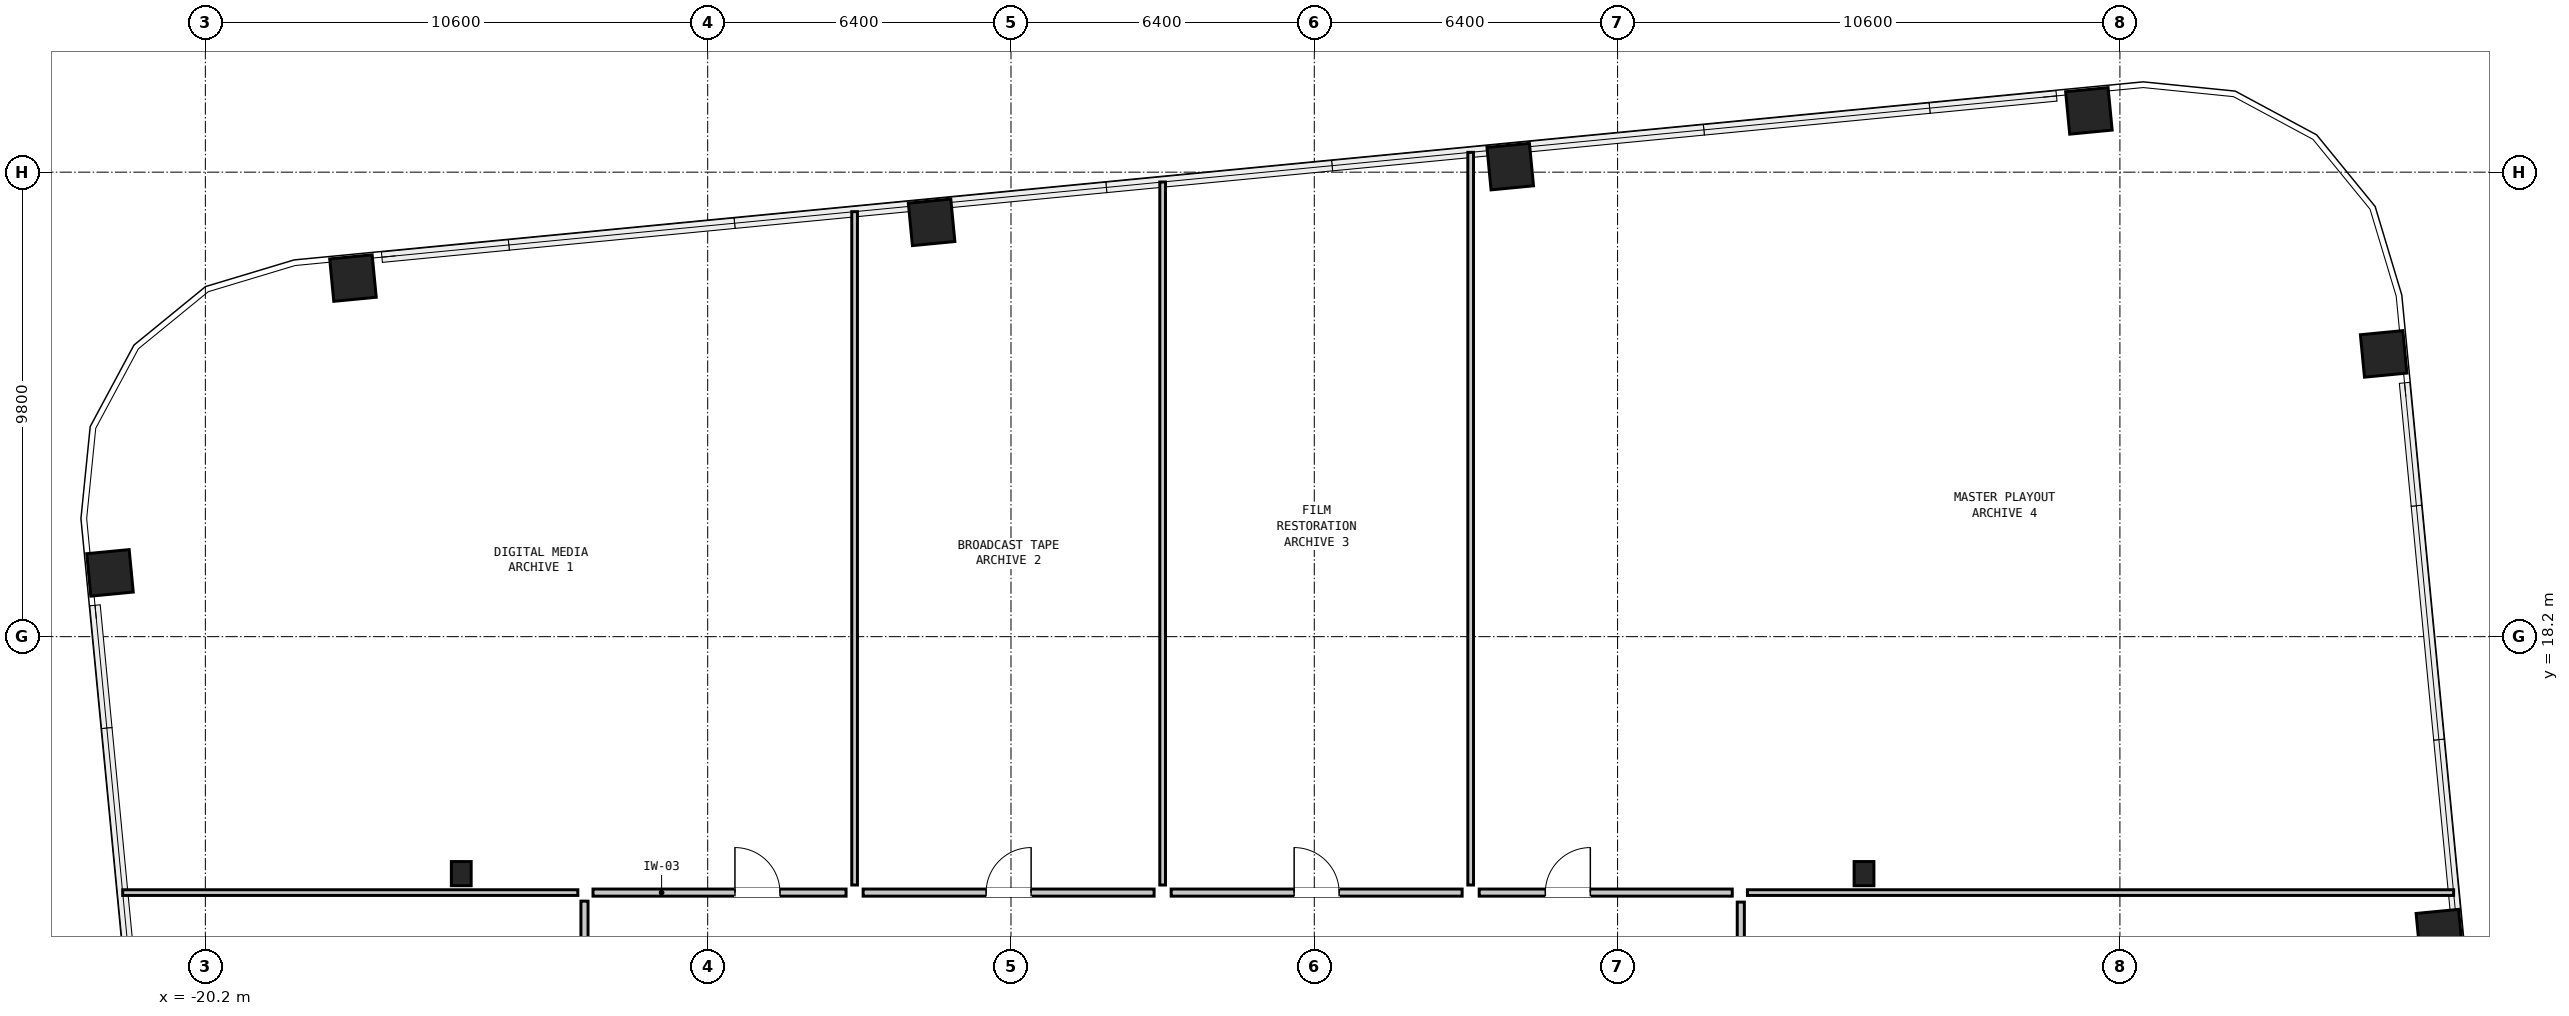
"""IFC4 building model, lengths in metres.
Left out: names, types, materials, properties, quantities, classifications, styles, units other than length and angle.
Written with IfcOpenShell. Run it as: python <this file> out.ifc"""

import sys

from ifc_helpers import new_model, si_unit, direction, frame, frame_2d, origin, origin_2d, place, context, subcontext, project, spatial, rectangle, hollow_rectangle, i_section, extrude, element, fill, save


model = new_model("IFC4")
c1 = context("Model", 3, precision=1e-05, world=origin(), true_north=direction((0.0, 1.0)))
c2 = subcontext(c1, "Body", "Model", "MODEL_VIEW")
j1 = project(units=[si_unit("LENGTHUNIT", "METRE"), si_unit("PLANEANGLEUNIT", "RADIAN")], contexts=[c1])
p1 = place(None, origin())
s1 = spatial("IfcSite", under=j1, at=p1, CompositionType="ELEMENT")
p2 = place(p1, origin())
s2 = spatial("IfcBuilding", under=s1, at=p2, CompositionType="ELEMENT")
p3 = place(p2, frame((0.0, 0.0, 87.75)))
s3 = spatial("IfcBuildingStorey", under=s2, at=p3, CompositionType="ELEMENT", Elevation=87.75)
for number, where, z_axis, x_axis in (
    (1, (26.941, 11.955, 0.0), (0.0, 0.0, 1.0), (-0.096, 0.995, 0.0)),
    (2, (25.765, 24.165, 0.0), (0.0, 0.0, 1.0), (-0.096, 0.995, 0.0)),
    (3, (19.545, 29.292, 0.0), (0.0, 0.0, 1.0), (0.995, 0.096, 0.0)),
    (4, (7.335, 28.117, 0.0), (0.0, 0.0, 1.0), (0.995, 0.096, 0.0)),
    (5, (-4.875, 26.941, 0.0), (0.0, 0.0, 1.0), (0.995, 0.096, 0.0)),
    (6, (-17.085, 25.765, 0.0), (0.0, 0.0, 1.0), (0.995, 0.096, 0.0)),
    (7, (-22.213, 19.545, 0.0), (0.0, 0.0, 1.0), (-0.096, 0.995, 0.0)),
):
    element("IfcColumn", number, at=place(p3, frame(where, z_axis=z_axis, x_axis=x_axis)), inside=s3, PredefinedType="COLUMN", context=c2, shape_type="SweptSolid", body=[
        extrude(hollow_rectangle(XDim=0.9, YDim=0.9, WallThickness=0.055, at=origin_2d()), origin(), (0.0, 0.0, 1.0), 3.05),
    ])
for number, where, z_axis, x_axis in (
    (8, (-14.8, 13.2, 0.0), (0.0, 0.0, 1.0), (1.0, 0.0, 0.0)),
    (9, (14.8, 13.2, 0.0), (0.0, 0.0, 1.0), (1.0, 0.0, 0.0)),
):
    element("IfcColumn", number, at=place(p3, frame(where, z_axis=z_axis, x_axis=x_axis)), inside=s3, PredefinedType="COLUMN", context=c2, shape_type="SweptSolid", body=[
        extrude(i_section(OverallWidth=0.418, OverallDepth=0.51, WebThickness=0.042, FlangeThickness=0.068, at=origin_2d()), origin(), (0.0, 0.0, 1.0), 3.05),
    ])
p4 = place(p3, frame((-21.945, 12.8, 0.0), z_axis=(0.0, 0.0, 1.0), x_axis=(1.0, 0.0, 0.0)))
e10 = element("IfcWall", 10, at=p4, inside=s3, PredefinedType="PARTITIONING", context=c2, shape_type="SweptSolid", body=[
    extrude(rectangle(XDim=9.605, YDim=0.12, at=frame_2d((4.802, 0.0))), origin(), (0.0, 0.0, 1.0), 2.83),
])
p5 = place(p3, frame((12.34, 12.8, 0.0), z_axis=(0.0, 0.0, 1.0), x_axis=(1.0, 0.0, 0.0)))
e11 = element("IfcWall", 11, at=p5, inside=s3, PredefinedType="PARTITIONING", context=c2, shape_type="SweptSolid", body=[
    extrude(rectangle(XDim=14.902, YDim=0.12, at=frame_2d((7.451, 0.0))), origin(), (0.0, 0.0, 1.0), 2.83),
])
p6 = place(p3, frame((-6.5, 12.96, 0.0), z_axis=(0.0, 0.0, 1.0), x_axis=(0.0, 1.0, 0.0)))
e12 = element("IfcWall", 12, at=p6, inside=s3, PredefinedType="PARTITIONING", context=c2, shape_type="SweptSolid", body=[
    extrude(rectangle(XDim=14.207, YDim=0.12, at=frame_2d((7.103, 0.0))), origin(), (0.0, 0.0, 1.0), 2.274),
])
p7 = place(p3, frame((0.0, 12.96, 0.0), z_axis=(0.0, 0.0, 1.0), x_axis=(0.0, 1.0, 0.0)))
e13 = element("IfcWall", 13, at=p7, inside=s3, PredefinedType="PARTITIONING", context=c2, shape_type="SweptSolid", body=[
    extrude(rectangle(XDim=14.833, YDim=0.12, at=frame_2d((7.416, 0.0))), origin(), (0.0, 0.0, 1.0), 2.274),
])
p8 = place(p3, frame((6.5, 12.96, 0.0), z_axis=(0.0, 0.0, 1.0), x_axis=(0.0, 1.0, 0.0)))
e14 = element("IfcWall", 14, at=p8, inside=s3, PredefinedType="PARTITIONING", context=c2, shape_type="SweptSolid", body=[
    extrude(rectangle(XDim=15.458, YDim=0.12, at=frame_2d((7.729, 0.0))), origin(), (0.0, 0.0, 1.0), 2.274),
])
p9 = place(p3, frame((-12.02, 12.8, 0.0), z_axis=(0.0, 0.0, 1.0), x_axis=(1.0, 0.0, 0.0)))
e15 = element("IfcWall", 15, at=p9, inside=s3, PredefinedType="PARTITIONING", context=c2, shape_type="SweptSolid", body=[
    extrude(rectangle(XDim=5.34, YDim=0.15, at=frame_2d((2.67, 0.0))), origin(), (0.0, 0.0, 1.0), 2.83),
])
p10 = place(p9, frame((2.995, 0.0, 0.0)))
e16 = element("IfcOpeningElement", 16, at=p10, cuts=e15, PredefinedType="OPENING", context=c2, shape_type="SweptSolid", body=[
    extrude(rectangle(XDim=0.95, YDim=2.1, at=frame_2d((0.475, 1.05))), frame((0.0, 0.087, 0.0), z_axis=(0.0, -1.0, 0.0), x_axis=(1.0, 0.0, 0.0)), (0.0, 0.0, 1.0), 0.174),
])
p11 = place(p3, frame((-6.32, 12.8, 0.0), z_axis=(0.0, 0.0, 1.0), x_axis=(1.0, 0.0, 0.0)))
e17 = element("IfcWall", 17, at=p11, inside=s3, PredefinedType="PARTITIONING", context=c2, shape_type="SweptSolid", body=[
    extrude(rectangle(XDim=6.14, YDim=0.15, at=frame_2d((3.07, 0.0))), origin(), (0.0, 0.0, 1.0), 2.83),
])
p12 = place(p11, frame((2.595, 0.0, 0.0)))
e18 = element("IfcOpeningElement", 18, at=p12, cuts=e17, PredefinedType="OPENING", context=c2, shape_type="SweptSolid", body=[
    extrude(rectangle(XDim=0.95, YDim=2.1, at=frame_2d((0.475, 1.05))), frame((0.0, 0.087, 0.0), z_axis=(0.0, -1.0, 0.0), x_axis=(1.0, 0.0, 0.0)), (0.0, 0.0, 1.0), 0.174),
])
p13 = place(p3, frame((0.18, 12.8, 0.0), z_axis=(0.0, 0.0, 1.0), x_axis=(1.0, 0.0, 0.0)))
e19 = element("IfcWall", 19, at=p13, inside=s3, PredefinedType="PARTITIONING", context=c2, shape_type="SweptSolid", body=[
    extrude(rectangle(XDim=6.14, YDim=0.15, at=frame_2d((3.07, 0.0))), origin(), (0.0, 0.0, 1.0), 2.83),
])
p14 = place(p13, frame((2.595, 0.0, 0.0)))
e20 = element("IfcOpeningElement", 20, at=p14, cuts=e19, PredefinedType="OPENING", context=c2, shape_type="SweptSolid", body=[
    extrude(rectangle(XDim=0.95, YDim=2.1, at=frame_2d((0.475, 1.05))), frame((0.0, 0.087, 0.0), z_axis=(0.0, -1.0, 0.0), x_axis=(1.0, 0.0, 0.0)), (0.0, 0.0, 1.0), 0.174),
])
p15 = place(p3, frame((6.68, 12.8, 0.0), z_axis=(0.0, 0.0, 1.0), x_axis=(1.0, 0.0, 0.0)))
e21 = element("IfcWall", 21, at=p15, inside=s3, PredefinedType="PARTITIONING", context=c2, shape_type="SweptSolid", body=[
    extrude(rectangle(XDim=5.34, YDim=0.15, at=frame_2d((2.67, 0.0))), origin(), (0.0, 0.0, 1.0), 2.83),
])
p16 = place(p15, frame((1.395, 0.0, 0.0)))
e22 = element("IfcOpeningElement", 22, at=p16, cuts=e21, PredefinedType="OPENING", context=c2, shape_type="SweptSolid", body=[
    extrude(rectangle(XDim=0.95, YDim=2.1, at=frame_2d((0.475, 1.05))), frame((0.0, 0.087, 0.0), z_axis=(0.0, -1.0, 0.0), x_axis=(1.0, 0.0, 0.0)), (0.0, 0.0, 1.0), 0.174),
])
p17 = place(p3, frame((-12.2, 3.68, 0.0), z_axis=(0.0, 0.0, 1.0), x_axis=(0.0, 1.0, 0.0)))
e23 = element("IfcWall", 23, at=p17, inside=s3, PredefinedType="PARTITIONING", context=c2, shape_type="SweptSolid", body=[
    extrude(rectangle(XDim=8.94, YDim=0.15, at=frame_2d((4.47, 0.0))), origin(), (0.0, 0.0, 1.0), 2.83),
])
p18 = place(p17, frame((3.995, 0.0, 0.0)))
e24 = element("IfcOpeningElement", 24, at=p18, cuts=e23, PredefinedType="OPENING", context=c2, shape_type="SweptSolid", body=[
    extrude(rectangle(XDim=0.95, YDim=2.1, at=frame_2d((0.475, 1.05))), frame((0.0, 0.087, 0.0), z_axis=(0.0, -1.0, 0.0), x_axis=(1.0, 0.0, 0.0)), (0.0, 0.0, 1.0), 0.174),
])
p19 = place(p3, frame((12.2, 3.8, 0.0), z_axis=(0.0, 0.0, 1.0), x_axis=(0.0, 1.0, 0.0)))
e25 = element("IfcWall", 25, at=p19, inside=s3, PredefinedType="PARTITIONING", context=c2, shape_type="SweptSolid", body=[
    extrude(rectangle(XDim=8.8, YDim=0.15, at=frame_2d((4.4, 0.0))), origin(), (0.0, 0.0, 1.0), 2.83),
])
p20 = place(p19, frame((3.925, 0.0, 0.0)))
e26 = element("IfcOpeningElement", 26, at=p20, cuts=e25, PredefinedType="OPENING", context=c2, shape_type="SweptSolid", body=[
    extrude(rectangle(XDim=0.95, YDim=2.1, at=frame_2d((0.475, 1.05))), frame((0.0, 0.087, 0.0), z_axis=(0.0, -1.0, 0.0), x_axis=(1.0, 0.0, 0.0)), (0.0, 0.0, 1.0), 0.174),
])
p21 = place(p10, origin())
e27 = element("IfcDoor", 27, at=p21, inside=s3, OperationType="SINGLE_SWING_LEFT", PredefinedType="DOOR", context=c2, shape_type="SweptSolid", body=[
    extrude(rectangle(XDim=0.95, YDim=2.1, at=frame_2d((0.475, 1.05))), frame((0.0, 0.025, 0.0), z_axis=(0.0, -1.0, 0.0), x_axis=(1.0, 0.0, 0.0)), (0.0, 0.0, 1.0), 0.05),
])
fill(e16, e27)
p22 = place(p12, origin())
e28 = element("IfcDoor", 28, at=p22, inside=s3, OperationType="SINGLE_SWING_RIGHT", PredefinedType="DOOR", context=c2, shape_type="SweptSolid", body=[
    extrude(rectangle(XDim=0.95, YDim=2.1, at=frame_2d((0.475, 1.05))), frame((0.0, 0.025, 0.0), z_axis=(0.0, -1.0, 0.0), x_axis=(1.0, 0.0, 0.0)), (0.0, 0.0, 1.0), 0.05),
])
fill(e18, e28)
p23 = place(p14, origin())
e29 = element("IfcDoor", 29, at=p23, inside=s3, OperationType="SINGLE_SWING_LEFT", PredefinedType="DOOR", context=c2, shape_type="SweptSolid", body=[
    extrude(rectangle(XDim=0.95, YDim=2.1, at=frame_2d((0.475, 1.05))), frame((0.0, 0.025, 0.0), z_axis=(0.0, -1.0, 0.0), x_axis=(1.0, 0.0, 0.0)), (0.0, 0.0, 1.0), 0.05),
])
fill(e20, e29)
p24 = place(p16, origin())
e30 = element("IfcDoor", 30, at=p24, inside=s3, OperationType="SINGLE_SWING_RIGHT", PredefinedType="DOOR", context=c2, shape_type="SweptSolid", body=[
    extrude(rectangle(XDim=0.95, YDim=2.1, at=frame_2d((0.475, 1.05))), frame((0.0, 0.025, 0.0), z_axis=(0.0, -1.0, 0.0), x_axis=(1.0, 0.0, 0.0)), (0.0, 0.0, 1.0), 0.05),
])
fill(e22, e30)
save(model, sys.argv[1])
